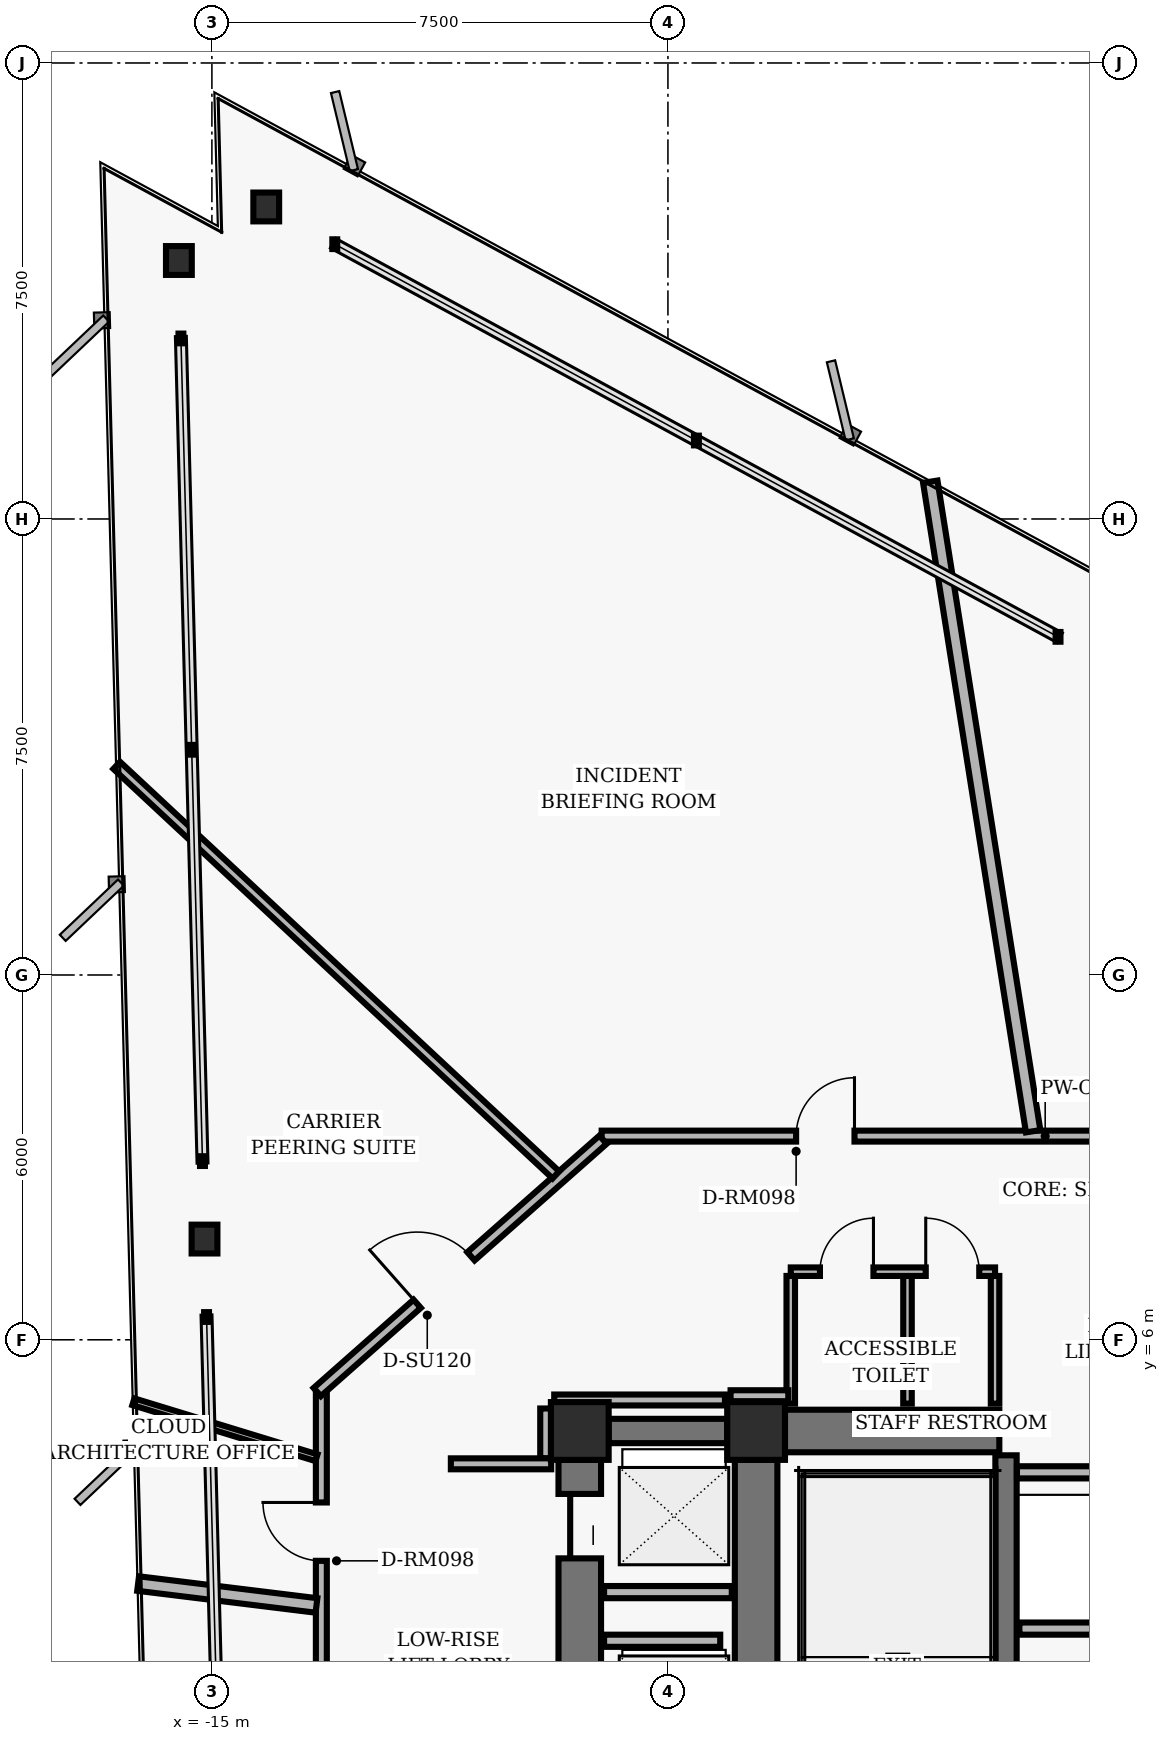
"""IFC4 building model, lengths in metres.
Left out: names, types, materials, properties, quantities, classifications, styles, units other than length and angle.
Written with IfcOpenShell. Run it as: python <this file> out.ifc"""

import sys

from ifc_helpers import new_model, si_unit, direction, frame, frame_2d, origin, origin_2d, place, context, subcontext, project, spatial, rectangle, hollow_rectangle, i_section, extrude, element, fill, save


model = new_model("IFC4")
c1 = context("Model", 3, precision=1e-05, world=origin(), true_north=direction((0.0, 1.0)))
c2 = subcontext(c1, "Body", "Model", "MODEL_VIEW")
j1 = project(units=[si_unit("LENGTHUNIT", "METRE"), si_unit("PLANEANGLEUNIT", "RADIAN")], contexts=[c1])
p1 = place(None, origin())
s1 = spatial("IfcSite", under=j1, at=p1, CompositionType="ELEMENT")
p2 = place(p1, origin())
s2 = spatial("IfcBuilding", under=s1, at=p2, CompositionType="ELEMENT")
p3 = place(p2, frame((0.0, 0.0, 35.68)))
s3 = spatial("IfcBuildingStorey", under=s2, at=p3, CompositionType="ELEMENT", Elevation=35.68)
for number, where, z_axis, x_axis in (
    (1, (-6.05, 4.5, 0.0), (0.0, 0.0, 1.0), (1.0, 0.0, 0.0)),
    (2, (-8.95, 4.5, 0.0), (0.0, 0.0, 1.0), (1.0, 0.0, 0.0)),
):
    element("IfcColumn", number, at=place(p3, frame(where, z_axis=z_axis, x_axis=x_axis)), inside=s3, PredefinedType="COLUMN", context=c2, shape_type="SweptSolid", body=[
        extrude(hollow_rectangle(XDim=0.95, YDim=0.95, WallThickness=0.06, InnerFilletRadius=0.02, OuterFilletRadius=0.04, at=origin_2d()), origin(), (0.0, 0.0, 1.0), 3.36),
    ])
p4 = place(p3, frame((-6.05, 0.475, 0.0), z_axis=(0.0, 0.0, 1.0), x_axis=(0.0, 1.0, 0.0)))
e3 = element("IfcWall", 3, at=p4, inside=s3, PredefinedType="SHEAR", context=c2, shape_type="SweptSolid", body=[
    extrude(rectangle(XDim=3.55, YDim=0.7, at=frame_2d((1.775, 0.0))), origin(), (0.0, 0.0, 1.0), 3.098),
])
p5 = place(p3, frame((-1.94, -4.1, 0.0), z_axis=(0.0, 0.0, 1.0), x_axis=(0.0, 1.0, 0.0)))
e4 = element("IfcWall", 4, at=p5, inside=s3, PredefinedType="SHEAR", context=c2, shape_type="SweptSolid", body=[
    extrude(rectangle(XDim=8.2, YDim=0.35, at=frame_2d((4.1, 0.0))), origin(), (0.0, 0.0, 1.0), 3.098),
])
p6 = place(p3, frame((-5.575, 4.5, 0.0), z_axis=(0.0, 0.0, 1.0), x_axis=(1.0, 0.0, 0.0)))
e5 = element("IfcWall", 5, at=p6, inside=s3, PredefinedType="SHEAR", context=c2, shape_type="SweptSolid", body=[
    extrude(rectangle(XDim=3.525, YDim=0.7, at=frame_2d((1.762, 0.0))), origin(), (0.0, 0.0, 1.0), 3.098),
])
p7 = place(p3, frame((-8.95, -3.825, 0.0), z_axis=(0.0, 0.0, 1.0), x_axis=(0.0, 1.0, 0.0)))
e6 = element("IfcWall", 6, at=p7, inside=s3, PredefinedType="SHEAR", context=c2, shape_type="SweptSolid", body=[
    extrude(rectangle(XDim=7.85, YDim=0.7, at=frame_2d((3.925, 0.0))), origin(), (0.0, 0.0, 1.0), 3.098),
])
p8 = place(p7, frame((0.55, 0.0, 0.0)))
e7 = element("IfcOpeningElement", 7, at=p8, cuts=e6, PredefinedType="OPENING", context=c2, shape_type="SweptSolid", body=[
    extrude(rectangle(XDim=1.06, YDim=2.04, at=frame_2d((0.53, 1.02))), frame((0.0, 0.36, 0.0), z_axis=(0.0, -1.0, 0.0), x_axis=(1.0, 0.0, 0.0)), (0.0, 0.0, 1.0), 0.72),
])
p9 = place(p7, frame((3.395, 0.0, 0.0)))
e8 = element("IfcOpeningElement", 8, at=p9, cuts=e6, PredefinedType="OPENING", context=c2, shape_type="SweptSolid", body=[
    extrude(rectangle(XDim=1.06, YDim=2.04, at=frame_2d((0.53, 1.02))), frame((0.0, 0.36, 0.0), z_axis=(0.0, -1.0, 0.0), x_axis=(1.0, 0.0, 0.0)), (0.0, 0.0, 1.0), 0.72),
])
p10 = place(p7, frame((6.23, 0.0, 0.0)))
e9 = element("IfcOpeningElement", 9, at=p10, cuts=e6, PredefinedType="OPENING", context=c2, shape_type="SweptSolid", body=[
    extrude(rectangle(XDim=1.06, YDim=2.04, at=frame_2d((0.53, 1.02))), frame((0.0, 0.36, 0.0), z_axis=(0.0, -1.0, 0.0), x_axis=(1.0, 0.0, 0.0)), (0.0, 0.0, 1.0), 0.72),
])
p11 = place(p3, frame((-8.475, 4.5, 0.0), z_axis=(0.0, 0.0, 1.0), x_axis=(1.0, 0.0, 0.0)))
e10 = element("IfcWall", 10, at=p11, inside=s3, PredefinedType="SHEAR", context=c2, shape_type="SweptSolid", body=[
    extrude(rectangle(XDim=1.95, YDim=0.4, at=frame_2d((0.975, 0.0))), origin(), (0.0, 0.0, 1.0), 3.098),
])
for number, where, z_axis, x_axis in (
    (11, (-14.106, 24.632, 0.0), (0.0, 0.0, 1.0), (1.0, 0.0, 0.0)),
    (12, (-15.543, 23.751, 0.0), (0.0, 0.0, 1.0), (1.0, 0.0, 0.0)),
    (13, (-15.121, 7.657, 0.0), (0.0, 0.0, 1.0), (1.0, 0.0, 0.0)),
):
    element("IfcColumn", number, at=place(p3, frame(where, z_axis=z_axis, x_axis=x_axis)), inside=s3, PredefinedType="COLUMN", context=c2, shape_type="SweptSolid", body=[
        extrude(i_section(OverallWidth=0.424, OverallDepth=0.474, WebThickness=0.048, FlangeThickness=0.077, FilletRadius=0.025, at=origin_2d()), origin(), (0.0, 0.0, 1.0), 3.36),
    ])
p12 = place(p3, frame((-1.72, 1.25, 0.0), z_axis=(0.0, 0.0, 1.0), x_axis=(1.0, 0.0, 0.0)))
e14 = element("IfcWall", 14, at=p12, inside=s3, PredefinedType="PARTITIONING", context=c2, shape_type="SweptSolid", body=[
    extrude(rectangle(XDim=3.44, YDim=0.2, at=frame_2d((1.72, 0.0))), origin(), (0.0, 0.0, 1.0), 3.073),
])
p13 = place(p3, frame((-1.76, 3.82, 0.0), z_axis=(0.0, 0.0, 1.0), x_axis=(1.0, 0.0, 0.0)))
e15 = element("IfcWall", 15, at=p13, inside=s3, PredefinedType="PARTITIONING", context=c2, shape_type="SweptSolid", body=[
    extrude(rectangle(XDim=3.52, YDim=0.2, at=frame_2d((1.76, 0.0))), origin(), (0.0, 0.0, 1.0), 3.073),
])
for number, where, z_axis, x_axis in (
    (16, (-5.48, 4.95, 0.0), (0.0, 0.0, 1.0), (0.0, 1.0, 0.0)),
    (17, (-3.56, 4.95, 0.0), (0.0, 0.0, 1.0), (0.0, 1.0, 0.0)),
    (18, (-2.12, 4.95, 0.0), (0.0, 0.0, 1.0), (0.0, 1.0, 0.0)),
):
    element("IfcWall", number, at=place(p3, frame(where, z_axis=z_axis, x_axis=x_axis)), inside=s3, PredefinedType="PARTITIONING", context=c2, shape_type="SweptSolid", body=[
        extrude(rectangle(XDim=2.1, YDim=0.14, at=frame_2d((1.05, 0.0))), origin(), (0.0, 0.0, 1.0), 3.073),
    ])
p14 = place(p3, frame((-5.48, 7.12, 0.0), z_axis=(0.0, 0.0, 1.0), x_axis=(1.0, 0.0, 0.0)))
e19 = element("IfcWall", 19, at=p14, inside=s3, PredefinedType="PARTITIONING", context=c2, shape_type="SweptSolid", body=[
    extrude(rectangle(XDim=3.36, YDim=0.14, at=frame_2d((1.68, 0.0))), origin(), (0.0, 0.0, 1.0), 3.073),
])
p15 = place(p14, frame((0.48, 0.0, 0.0)))
e20 = element("IfcOpeningElement", 20, at=p15, cuts=e19, PredefinedType="OPENING", context=c2, shape_type="SweptSolid", body=[
    extrude(rectangle(XDim=0.88, YDim=2.02, at=frame_2d((0.44, 1.01))), frame((0.0, 0.08, 0.0), z_axis=(0.0, -1.0, 0.0), x_axis=(1.0, 0.0, 0.0)), (0.0, 0.0, 1.0), 0.16),
])
p16 = place(p14, frame((2.22, 0.0, 0.0)))
e21 = element("IfcOpeningElement", 21, at=p16, cuts=e19, PredefinedType="OPENING", context=c2, shape_type="SweptSolid", body=[
    extrude(rectangle(XDim=0.88, YDim=2.02, at=frame_2d((0.44, 1.01))), frame((0.0, 0.08, 0.0), z_axis=(0.0, -1.0, 0.0), x_axis=(1.0, 0.0, 0.0)), (0.0, 0.0, 1.0), 0.16),
])
p17 = place(p3, frame((-8.55, 1.85, 0.0), z_axis=(0.0, 0.0, 1.0), x_axis=(1.0, 0.0, 0.0)))
e22 = element("IfcWall", 22, at=p17, inside=s3, PredefinedType="PARTITIONING", context=c2, shape_type="SweptSolid", body=[
    extrude(rectangle(XDim=2.1, YDim=0.2, at=frame_2d((1.05, 0.0))), origin(), (0.0, 0.0, 1.0), 3.073),
])
p18 = place(p3, frame((-8.55, 1.05, 0.0), z_axis=(0.0, 0.0, 1.0), x_axis=(1.0, 0.0, 0.0)))
e23 = element("IfcWall", 23, at=p18, inside=s3, PredefinedType="PARTITIONING", context=c2, shape_type="SweptSolid", body=[
    extrude(rectangle(XDim=1.91, YDim=0.2, at=frame_2d((0.955, 0.0))), origin(), (0.0, 0.0, 1.0), 3.073),
])
p19 = place(p3, frame((-8.59, 9.35, 0.0), z_axis=(0.0, 0.0, 1.0), x_axis=(1.0, 0.0, 0.0)))
e24 = element("IfcWall", 24, at=p19, inside=s3, PredefinedType="PARTITIONING", context=c2, shape_type="SweptSolid", body=[
    extrude(rectangle(XDim=17.18, YDim=0.18, at=frame_2d((8.59, 0.0))), origin(), (0.0, 0.0, 1.0), 2.587),
])
p20 = place(p19, frame((10.43, 0.0, 0.0)))
e25 = element("IfcOpeningElement", 25, at=p20, cuts=e24, PredefinedType="OPENING", context=c2, shape_type="SweptSolid", body=[
    extrude(rectangle(XDim=0.96, YDim=2.02, at=frame_2d((0.48, 1.01))), frame((0.0, 0.1, 0.0), z_axis=(0.0, -1.0, 0.0), x_axis=(1.0, 0.0, 0.0)), (0.0, 0.0, 1.0), 0.2),
])
p21 = place(p19, frame((3.198, 0.0, 0.0)))
e26 = element("IfcOpeningElement", 26, at=p21, cuts=e24, PredefinedType="OPENING", context=c2, shape_type="SweptSolid", body=[
    extrude(rectangle(XDim=0.96, YDim=2.02, at=frame_2d((0.48, 1.01))), frame((0.0, 0.1, 0.0), z_axis=(0.0, -1.0, 0.0), x_axis=(1.0, 0.0, 0.0)), (0.0, 0.0, 1.0), 0.2),
])
p22 = place(p3, frame((-13.2, -5.11, 0.0), z_axis=(0.0, 0.0, 1.0), x_axis=(0.0, 1.0, 0.0)))
e27 = element("IfcWall", 27, at=p22, inside=s3, PredefinedType="PARTITIONING", context=c2, shape_type="SweptSolid", body=[
    extrude(rectangle(XDim=10.22, YDim=0.18, at=frame_2d((5.11, 0.0))), origin(), (0.0, 0.0, 1.0), 2.587),
])
p23 = place(p22, frame((3.02, 0.0, 0.0)))
e28 = element("IfcOpeningElement", 28, at=p23, cuts=e27, PredefinedType="OPENING", context=c2, shape_type="SweptSolid", body=[
    extrude(rectangle(XDim=0.96, YDim=2.02, at=frame_2d((0.48, 1.01))), frame((0.0, 0.1, 0.0), z_axis=(0.0, -1.0, 0.0), x_axis=(1.0, 0.0, 0.0)), (0.0, 0.0, 1.0), 0.2),
])
p24 = place(p22, frame((7.474, 0.0, 0.0)))
e29 = element("IfcOpeningElement", 29, at=p24, cuts=e27, PredefinedType="OPENING", context=c2, shape_type="SweptSolid", body=[
    extrude(rectangle(XDim=0.96, YDim=2.02, at=frame_2d((0.48, 1.01))), frame((0.0, 0.1, 0.0), z_axis=(0.0, -1.0, 0.0), x_axis=(1.0, 0.0, 0.0)), (0.0, 0.0, 1.0), 0.2),
])
p25 = place(p3, frame((-13.268, 5.14, 0.0), z_axis=(0.0, 0.0, 1.0), x_axis=(0.749626463267, 0.66186113768, 0.0)))
e30 = element("IfcWall", 30, at=p25, inside=s3, PredefinedType="PARTITIONING", context=c2, shape_type="SweptSolid", body=[
    extrude(rectangle(XDim=6.27, YDim=0.18, at=frame_2d((3.135, 0.0))), origin(), (0.0, 0.0, 1.0), 3.073),
])
p26 = place(p25, frame((2.193, 0.0, 0.0)))
e31 = element("IfcOpeningElement", 31, at=p26, cuts=e30, PredefinedType="OPENING", context=c2, shape_type="SweptSolid", body=[
    extrude(rectangle(XDim=1.18, YDim=2.02, at=frame_2d((0.59, 1.01))), frame((0.0, 0.1, 0.0), z_axis=(0.0, -1.0, 0.0), x_axis=(1.0, 0.0, 0.0)), (0.0, 0.0, 1.0), 0.2),
])
p27 = place(p3, frame((-9.51, 4.87, 0.0), z_axis=(0.0, 0.0, 1.0), x_axis=(0.0, -1.0, 0.0)))
e32 = element("IfcWall", 32, at=p27, inside=s3, PredefinedType="PARTITIONING", context=c2, shape_type="SweptSolid", body=[
    extrude(rectangle(XDim=0.82, YDim=0.18, at=frame_2d((0.41, 0.0))), origin(), (0.0, 0.0, 1.0), 3.073),
])
p28 = place(p3, frame((-9.42, 3.96, 0.0), z_axis=(0.0, 0.0, 1.0), x_axis=(-1.0, 0.0, 0.0)))
e33 = element("IfcWall", 33, at=p28, inside=s3, PredefinedType="PARTITIONING", context=c2, shape_type="SweptSolid", body=[
    extrude(rectangle(XDim=1.65, YDim=0.18, at=frame_2d((0.825, 0.0))), origin(), (0.0, 0.0, 1.0), 3.073),
])
p29 = place(p3, frame((-5.52, 5.08, 0.0), z_axis=(0.0, 0.0, 1.0), x_axis=(-1.0, 0.0, 0.0)))
e34 = element("IfcWall", 34, at=p29, inside=s3, PredefinedType="PARTITIONING", context=c2, shape_type="SweptSolid", body=[
    extrude(rectangle(XDim=0.95, YDim=0.18, at=frame_2d((0.475, 0.0))), origin(), (0.0, 0.0, 1.0), 3.073),
])
p30 = place(p3, frame((-6.562, 5.01, 0.0), z_axis=(0.0, 0.0, 1.0), x_axis=(-1.0, 0.0, 0.0)))
e35 = element("IfcWall", 35, at=p30, inside=s3, PredefinedType="PARTITIONING", context=c2, shape_type="SweptSolid", body=[
    extrude(rectangle(XDim=2.808, YDim=0.18, at=frame_2d((1.404, 0.0))), origin(), (0.0, 0.0, 1.0), 3.073),
])
p31 = place(p3, frame((-1.494, 9.43, 0.0), z_axis=(0.0, 0.0, 1.0), x_axis=(-0.156418067091, 0.987690937636, 0.0)))
e36 = element("IfcWall", 36, at=p31, inside=s3, PredefinedType="PARTITIONING", context=c2, shape_type="SweptSolid", body=[
    extrude(rectangle(XDim=10.816, YDim=0.24, at=frame_2d((5.408, 0.0))), origin(), (0.0, 0.0, 1.0), 3.073),
])
p32 = place(p3, frame((-9.343, 8.712, 0.0), z_axis=(0.0, 0.0, 1.0), x_axis=(-0.731347028882, 0.682005515627, 0.0)))
e37 = element("IfcWall", 37, at=p32, inside=s3, PredefinedType="PARTITIONING", context=c2, shape_type="SweptSolid", body=[
    extrude(rectangle(XDim=9.876, YDim=0.16, at=frame_2d((4.938, 0.0))), origin(), (0.0, 0.0, 1.0), 3.073),
])
p33 = place(p3, frame((-13.28, 4.06, 0.0), z_axis=(0.0, 0.0, 1.0), x_axis=(-0.956293781209, 0.292407599118, 0.0)))
e38 = element("IfcWall", 38, at=p33, inside=s3, PredefinedType="MOVABLE", context=c2, shape_type="SweptSolid", body=[
    extrude(rectangle(XDim=3.149, YDim=0.115, at=frame_2d((1.575, 0.0))), origin(), (0.0, 0.0, 1.0), 3.073),
])
p34 = place(p3, frame((-13.28, 1.631, 0.0), z_axis=(0.0, 0.0, 1.0), x_axis=(-0.992548714485, 0.121848468903, 0.0)))
e39 = element("IfcWall", 39, at=p34, inside=s3, PredefinedType="PARTITIONING", context=c2, shape_type="SweptSolid", body=[
    extrude(rectangle(XDim=2.955, YDim=0.24, at=frame_2d((1.478, 0.0))), origin(), (0.0, 0.0, 1.0), 3.073),
])
p35 = place(p15, origin())
e40 = element("IfcDoor", 40, at=p35, inside=s3, OperationType="SINGLE_SWING_RIGHT", PredefinedType="DOOR", context=c2, shape_type="SweptSolid", body=[
    extrude(rectangle(XDim=0.88, YDim=2.02, at=frame_2d((0.44, 1.01))), frame((0.0, 0.025, 0.0), z_axis=(0.0, -1.0, 0.0), x_axis=(1.0, 0.0, 0.0)), (0.0, 0.0, 1.0), 0.05),
])
fill(e20, e40)
p36 = place(p16, origin())
e41 = element("IfcDoor", 41, at=p36, inside=s3, OperationType="SINGLE_SWING_LEFT", PredefinedType="DOOR", context=c2, shape_type="SweptSolid", body=[
    extrude(rectangle(XDim=0.88, YDim=2.02, at=frame_2d((0.44, 1.01))), frame((0.0, 0.025, 0.0), z_axis=(0.0, -1.0, 0.0), x_axis=(1.0, 0.0, 0.0)), (0.0, 0.0, 1.0), 0.05),
])
fill(e21, e41)
p37 = place(p10, origin())
e42 = element("IfcDoor", 42, at=p37, inside=s3, OperationType="SLIDING_TO_LEFT", PredefinedType="DOOR", context=c2, shape_type="SweptSolid", body=[
    extrude(rectangle(XDim=1.06, YDim=2.04, at=frame_2d((0.53, 1.02))), frame((0.0, 0.025, 0.0), z_axis=(0.0, -1.0, 0.0), x_axis=(1.0, 0.0, 0.0)), (0.0, 0.0, 1.0), 0.05),
])
fill(e9, e42)
p38 = place(p21, origin())
e43 = element("IfcDoor", 43, at=p38, inside=s3, OperationType="SINGLE_SWING_RIGHT", PredefinedType="DOOR", context=c2, shape_type="SweptSolid", body=[
    extrude(rectangle(XDim=0.96, YDim=2.02, at=frame_2d((0.48, 1.01))), frame((0.0, 0.025, 0.0), z_axis=(0.0, -1.0, 0.0), x_axis=(1.0, 0.0, 0.0)), (0.0, 0.0, 1.0), 0.05),
])
fill(e26, e43)
p39 = place(p26, origin())
e44 = element("IfcDoor", 44, at=p39, inside=s3, OperationType="SINGLE_SWING_LEFT", PredefinedType="DOOR", context=c2, shape_type="SweptSolid", body=[
    extrude(rectangle(XDim=1.18, YDim=2.02, at=frame_2d((0.59, 1.01))), frame((0.0, 0.025, 0.0), z_axis=(0.0, -1.0, 0.0), x_axis=(1.0, 0.0, 0.0)), (0.0, 0.0, 1.0), 0.05),
])
fill(e31, e44)
p40 = place(p24, origin())
e45 = element("IfcDoor", 45, at=p40, inside=s3, OperationType="SINGLE_SWING_RIGHT", PredefinedType="DOOR", context=c2, shape_type="SweptSolid", body=[
    extrude(rectangle(XDim=0.96, YDim=2.02, at=frame_2d((0.48, 1.01))), frame((0.0, 0.025, 0.0), z_axis=(0.0, -1.0, 0.0), x_axis=(1.0, 0.0, 0.0)), (0.0, 0.0, 1.0), 0.05),
])
fill(e29, e45)
save(model, sys.argv[1])
